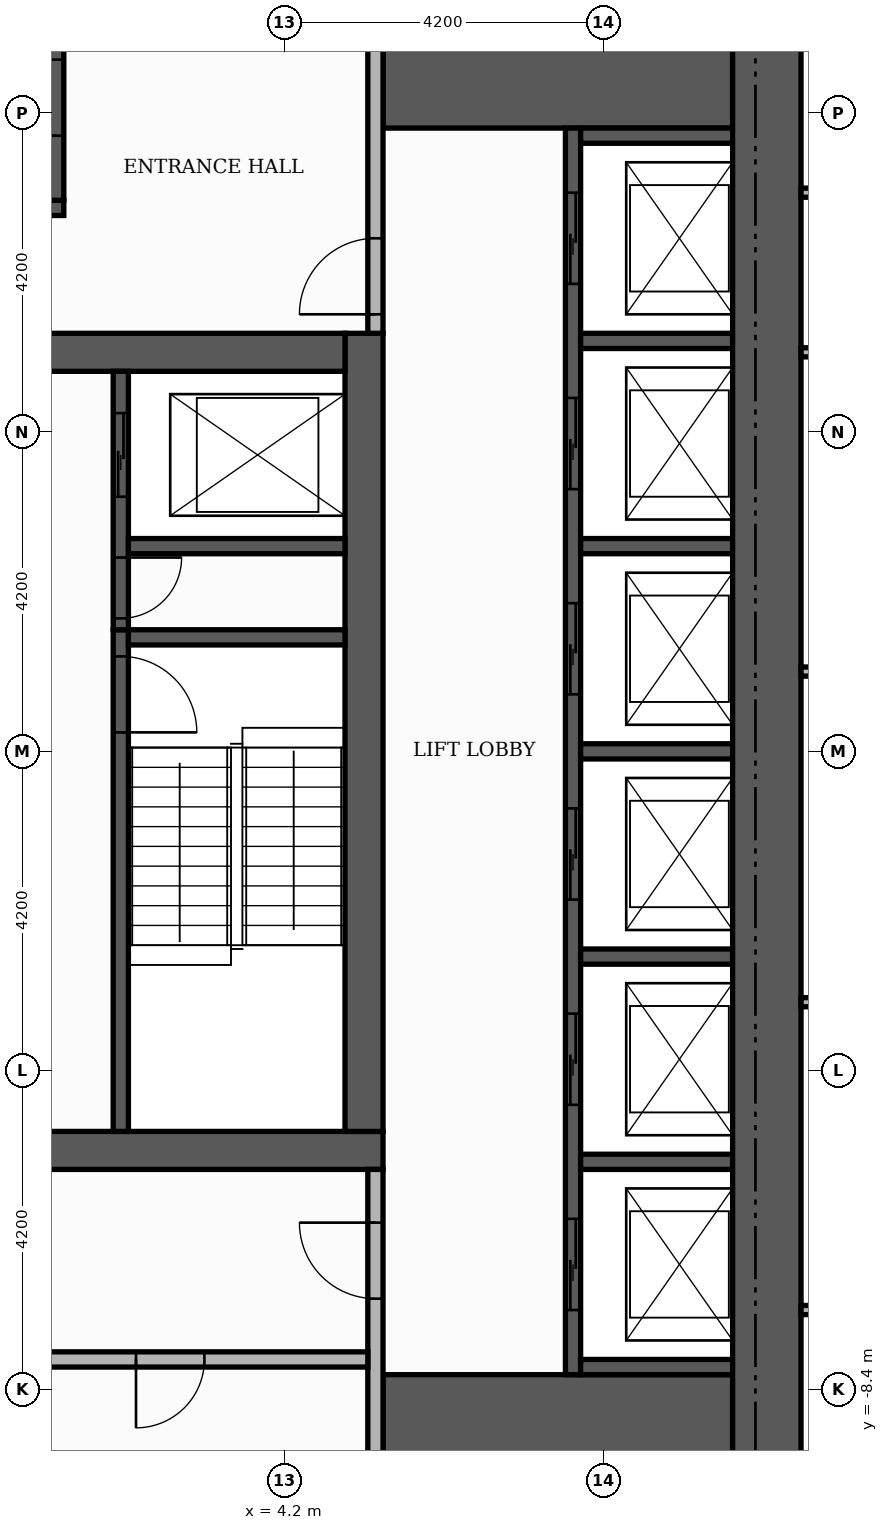
"""IFC4 building model, lengths in metres.
Left out: names, types, materials, properties, quantities, classifications, styles, units other than length and angle.
Written with IfcOpenShell. Run it as: python <this file> out.ifc"""

import sys

from ifc_helpers import new_model, si_unit, direction, frame, frame_2d, origin, place, context, subcontext, project, spatial, rectangle, extrude, element, fill, save


model = new_model("IFC4")
c1 = context("Model", 3, precision=1e-05, world=origin(), true_north=direction((0.0, 1.0)))
c2 = subcontext(c1, "Body", "Model", "MODEL_VIEW")
j1 = project(units=[si_unit("LENGTHUNIT", "METRE"), si_unit("PLANEANGLEUNIT", "RADIAN")], contexts=[c1])
p1 = place(None, origin())
s1 = spatial("IfcSite", under=j1, at=p1, CompositionType="ELEMENT")
p2 = place(p1, origin())
s2 = spatial("IfcBuilding", under=s1, at=p2, CompositionType="ELEMENT")
p3 = place(p2, frame((0.0, 0.0, 137.7)))
s3 = spatial("IfcBuildingStorey", under=s2, at=p3, CompositionType="ELEMENT", Elevation=137.7)
p4 = place(p3, frame((-5.5, -5.25, 0.0), z_axis=(0.0, 0.0, 1.0), x_axis=(1.0, 0.0, 0.0)))
e1 = element("IfcWall", 1, at=p4, inside=s3, PredefinedType="SHEAR", context=c2, shape_type="SweptSolid", body=[
    extrude(rectangle(XDim=11.0, YDim=0.5, at=frame_2d((5.5, 0.0))), origin(), (0.0, 0.0, 1.0), 3.48),
])
p5 = place(p4, frame((4.9, 0.0, 0.0)))
e2 = element("IfcOpeningElement", 2, at=p5, cuts=e1, PredefinedType="OPENING", context=c2, shape_type="SweptSolid", body=[
    extrude(rectangle(XDim=1.2, YDim=2.1, at=frame_2d((0.6, 1.05))), frame((0.0, 0.26, 0.0), z_axis=(0.0, -1.0, 0.0), x_axis=(1.0, 0.0, 0.0)), (0.0, 0.0, 1.0), 0.52),
])
p6 = place(p3, frame((5.25, -5.0, 0.0), z_axis=(0.0, 0.0, 1.0), x_axis=(0.0, 1.0, 0.0)))
e3 = element("IfcWall", 3, at=p6, inside=s3, PredefinedType="SHEAR", context=c2, shape_type="SweptSolid", body=[
    extrude(rectangle(XDim=10.5, YDim=0.5, at=frame_2d((5.25, 0.0))), origin(), (0.0, 0.0, 1.0), 3.48),
])
p7 = place(p3, frame((-5.0, 5.25, 0.0), z_axis=(0.0, 0.0, 1.0), x_axis=(1.0, 0.0, 0.0)))
e4 = element("IfcWall", 4, at=p7, inside=s3, PredefinedType="SHEAR", context=c2, shape_type="SweptSolid", body=[
    extrude(rectangle(XDim=10.0, YDim=0.5, at=frame_2d((5.0, 0.0))), origin(), (0.0, 0.0, 1.0), 3.48),
])
p8 = place(p7, frame((4.4, 0.0, 0.0)))
e5 = element("IfcOpeningElement", 5, at=p8, cuts=e4, PredefinedType="OPENING", context=c2, shape_type="SweptSolid", body=[
    extrude(rectangle(XDim=1.2, YDim=2.1, at=frame_2d((0.6, 1.05))), frame((0.0, 0.26, 0.0), z_axis=(0.0, -1.0, 0.0), x_axis=(1.0, 0.0, 0.0)), (0.0, 0.0, 1.0), 0.52),
])
for number, where, z_axis, x_axis in (
    (6, (5.5, -9.15, 0.0), (0.0, 0.0, 1.0), (1.0, 0.0, 0.0)),
    (7, (5.5, 9.15, 0.0), (0.0, 0.0, 1.0), (1.0, 0.0, 0.0)),
):
    element("IfcWall", number, at=place(p3, frame(where, z_axis=z_axis, x_axis=x_axis)), inside=s3, PredefinedType="SHEAR", context=c2, shape_type="SweptSolid", body=[
        extrude(rectangle(XDim=4.6, YDim=1.9, at=frame_2d((2.3, 0.0))), origin(), (0.0, 0.0, 1.0), 3.48),
    ])
p9 = place(p3, frame((2.05, -5.0, 0.0), z_axis=(0.0, 0.0, 1.0), x_axis=(0.0, 1.0, 0.0)))
e8 = element("IfcWall", 8, at=p9, inside=s3, PredefinedType="SHEAR", context=c2, shape_type="SweptSolid", body=[
    extrude(rectangle(XDim=6.6, YDim=0.2, at=frame_2d((3.3, 0.0))), origin(), (0.0, 0.0, 1.0), 3.48),
])
p10 = place(p9, frame((5.25, 0.0, 0.0)))
e9 = element("IfcOpeningElement", 9, at=p10, cuts=e8, PredefinedType="OPENING", context=c2, shape_type="SweptSolid", body=[
    extrude(rectangle(XDim=1.0, YDim=2.1, at=frame_2d((0.5, 1.05))), frame((0.0, 0.11, 0.0), z_axis=(0.0, -1.0, 0.0), x_axis=(1.0, 0.0, 0.0)), (0.0, 0.0, 1.0), 0.22),
])
p11 = place(p3, frame((2.15, 1.5, 0.0), z_axis=(0.0, 0.0, 1.0), x_axis=(1.0, 0.0, 0.0)))
e10 = element("IfcWall", 10, at=p11, inside=s3, PredefinedType="SHEAR", context=c2, shape_type="SweptSolid", body=[
    extrude(rectangle(XDim=2.85, YDim=0.2, at=frame_2d((1.425, 0.0))), origin(), (0.0, 0.0, 1.0), 3.48),
])
p12 = place(p3, frame((-5.5, 7.15, 0.0), z_axis=(0.0, 0.0, 1.0), x_axis=(1.0, 0.0, 0.0)))
e11 = element("IfcWall", 11, at=p12, inside=s3, PredefinedType="SHEAR", context=c2, shape_type="SweptSolid", body=[
    extrude(rectangle(XDim=6.8, YDim=0.2, at=frame_2d((3.4, 0.0))), origin(), (0.0, 0.0, 1.0), 3.48),
])
p13 = place(p3, frame((1.2, 7.25, 0.0), z_axis=(0.0, 0.0, 1.0), x_axis=(0.0, 1.0, 0.0)))
e12 = element("IfcWall", 12, at=p13, inside=s3, PredefinedType="SHEAR", context=c2, shape_type="SweptSolid", body=[
    extrude(rectangle(XDim=2.85, YDim=0.2, at=frame_2d((1.425, 0.0))), origin(), (0.0, 0.0, 1.0), 3.48),
])
p14 = place(p13, frame((0.85, 0.0, 0.0)))
e13 = element("IfcOpeningElement", 13, at=p14, cuts=e12, PredefinedType="OPENING", context=c2, shape_type="SweptSolid", body=[
    extrude(rectangle(XDim=1.0, YDim=2.1, at=frame_2d((0.5, 1.05))), frame((0.0, 0.11, 0.0), z_axis=(0.0, -1.0, 0.0), x_axis=(1.0, 0.0, 0.0)), (0.0, 0.0, 1.0), 0.22),
])
p15 = place(p3, frame((8.0, -8.2, 0.0), z_axis=(0.0, 0.0, 1.0), x_axis=(0.0, 1.0, 0.0)))
e14 = element("IfcWall", 14, at=p15, inside=s3, PredefinedType="SHEAR", context=c2, shape_type="SweptSolid", body=[
    extrude(rectangle(XDim=16.4, YDim=0.2, at=frame_2d((8.2, 0.0))), origin(), (0.0, 0.0, 1.0), 3.48),
])
p16 = place(p15, frame((0.85, 0.0, 0.0)))
e15 = element("IfcOpeningElement", 15, at=p16, cuts=e14, PredefinedType="OPENING", context=c2, shape_type="SweptSolid", body=[
    extrude(rectangle(XDim=1.2, YDim=2.1, at=frame_2d((0.6, 1.05))), frame((0.0, 0.11, 0.0), z_axis=(0.0, -1.0, 0.0), x_axis=(1.0, 0.0, 0.0)), (0.0, 0.0, 1.0), 0.22),
])
p17 = place(p15, frame((3.55, 0.0, 0.0)))
e16 = element("IfcOpeningElement", 16, at=p17, cuts=e14, PredefinedType="OPENING", context=c2, shape_type="SweptSolid", body=[
    extrude(rectangle(XDim=1.2, YDim=2.1, at=frame_2d((0.6, 1.05))), frame((0.0, 0.11, 0.0), z_axis=(0.0, -1.0, 0.0), x_axis=(1.0, 0.0, 0.0)), (0.0, 0.0, 1.0), 0.22),
])
p18 = place(p15, frame((6.25, 0.0, 0.0)))
e17 = element("IfcOpeningElement", 17, at=p18, cuts=e14, PredefinedType="OPENING", context=c2, shape_type="SweptSolid", body=[
    extrude(rectangle(XDim=1.2, YDim=2.1, at=frame_2d((0.6, 1.05))), frame((0.0, 0.11, 0.0), z_axis=(0.0, -1.0, 0.0), x_axis=(1.0, 0.0, 0.0)), (0.0, 0.0, 1.0), 0.22),
])
p19 = place(p15, frame((8.95, 0.0, 0.0)))
e18 = element("IfcOpeningElement", 18, at=p19, cuts=e14, PredefinedType="OPENING", context=c2, shape_type="SweptSolid", body=[
    extrude(rectangle(XDim=1.2, YDim=2.1, at=frame_2d((0.6, 1.05))), frame((0.0, 0.11, 0.0), z_axis=(0.0, -1.0, 0.0), x_axis=(1.0, 0.0, 0.0)), (0.0, 0.0, 1.0), 0.22),
])
p20 = place(p15, frame((11.65, 0.0, 0.0)))
e19 = element("IfcOpeningElement", 19, at=p20, cuts=e14, PredefinedType="OPENING", context=c2, shape_type="SweptSolid", body=[
    extrude(rectangle(XDim=1.2, YDim=2.1, at=frame_2d((0.6, 1.05))), frame((0.0, 0.11, 0.0), z_axis=(0.0, -1.0, 0.0), x_axis=(1.0, 0.0, 0.0)), (0.0, 0.0, 1.0), 0.22),
])
p21 = place(p15, frame((14.35, 0.0, 0.0)))
e20 = element("IfcOpeningElement", 20, at=p21, cuts=e14, PredefinedType="OPENING", context=c2, shape_type="SweptSolid", body=[
    extrude(rectangle(XDim=1.2, YDim=2.1, at=frame_2d((0.6, 1.05))), frame((0.0, 0.11, 0.0), z_axis=(0.0, -1.0, 0.0), x_axis=(1.0, 0.0, 0.0)), (0.0, 0.0, 1.0), 0.22),
])
for number, where, z_axis, x_axis in (
    (21, (8.1, -8.1, 0.0), (0.0, 0.0, 1.0), (1.0, 0.0, 0.0)),
    (22, (8.1, -5.4, 0.0), (0.0, 0.0, 1.0), (1.0, 0.0, 0.0)),
    (23, (8.1, -2.7, 0.0), (0.0, 0.0, 1.0), (1.0, 0.0, 0.0)),
    (24, (8.1, 0.0, 0.0), (0.0, 0.0, 1.0), (1.0, 0.0, 0.0)),
):
    element("IfcWall", number, at=place(p3, frame(where, z_axis=z_axis, x_axis=x_axis)), inside=s3, PredefinedType="SHEAR", context=c2, shape_type="SweptSolid", body=[
        extrude(rectangle(XDim=2.0, YDim=0.2, at=frame_2d((1.0, 0.0))), origin(), (0.0, 0.0, 1.0), 3.48),
    ])
p22 = place(p3, frame((2.05, 1.6, 0.0), z_axis=(0.0, 0.0, 1.0), x_axis=(0.0, 1.0, 0.0)))
e25 = element("IfcWall", 25, at=p22, inside=s3, PredefinedType="SHEAR", context=c2, shape_type="SweptSolid", body=[
    extrude(rectangle(XDim=3.4, YDim=0.2, at=frame_2d((1.7, 0.0))), origin(), (0.0, 0.0, 1.0), 3.48),
])
p23 = place(p22, frame((1.75, 0.0, 0.0)))
e26 = element("IfcOpeningElement", 26, at=p23, cuts=e25, PredefinedType="OPENING", context=c2, shape_type="SweptSolid", body=[
    extrude(rectangle(XDim=1.1, YDim=2.1, at=frame_2d((0.55, 1.05))), frame((0.0, 0.11, 0.0), z_axis=(0.0, -1.0, 0.0), x_axis=(1.0, 0.0, 0.0)), (0.0, 0.0, 1.0), 0.22),
])
p24 = place(p22, frame((0.15, 0.0, 0.0)))
e27 = element("IfcOpeningElement", 27, at=p24, cuts=e25, PredefinedType="OPENING", context=c2, shape_type="SweptSolid", body=[
    extrude(rectangle(XDim=0.8, YDim=2.1, at=frame_2d((0.4, 1.05))), frame((0.0, 0.11, 0.0), z_axis=(0.0, -1.0, 0.0), x_axis=(1.0, 0.0, 0.0)), (0.0, 0.0, 1.0), 0.22),
])
p25 = place(p3, frame((2.15, 2.7, 0.0), z_axis=(0.0, 0.0, 1.0), x_axis=(1.0, 0.0, 0.0)))
e28 = element("IfcWall", 28, at=p25, inside=s3, PredefinedType="SHEAR", context=c2, shape_type="SweptSolid", body=[
    extrude(rectangle(XDim=2.85, YDim=0.2, at=frame_2d((1.425, 0.0))), origin(), (0.0, 0.0, 1.0), 3.48),
])
for number, where, z_axis, x_axis in (
    (29, (8.1, 2.7, 0.0), (0.0, 0.0, 1.0), (1.0, 0.0, 0.0)),
    (30, (8.1, 5.4, 0.0), (0.0, 0.0, 1.0), (1.0, 0.0, 0.0)),
    (31, (8.1, 8.1, 0.0), (0.0, 0.0, 1.0), (1.0, 0.0, 0.0)),
):
    element("IfcWall", number, at=place(p3, frame(where, z_axis=z_axis, x_axis=x_axis)), inside=s3, PredefinedType="SHEAR", context=c2, shape_type="SweptSolid", body=[
        extrude(rectangle(XDim=2.0, YDim=0.2, at=frame_2d((1.0, 0.0))), origin(), (0.0, 0.0, 1.0), 3.48),
    ])
p26 = place(p3, frame((10.55, -10.1, 0.0), z_axis=(0.0, 0.0, 1.0), x_axis=(0.0, 1.0, 0.0)))
e32 = element("IfcWall", 32, at=p26, inside=s3, PredefinedType="SHEAR", context=c2, shape_type="SweptSolid", body=[
    extrude(rectangle(XDim=20.2, YDim=0.9, at=frame_2d((10.1, 0.0))), origin(), (0.0, 0.0, 1.0), 3.48),
])
p27 = place(p3, frame((5.4, -10.1, 0.0), z_axis=(0.0, 0.0, 1.0), x_axis=(0.0, 1.0, 0.0)))
e33 = element("IfcWall", 33, at=p27, inside=s3, PredefinedType="PARTITIONING", context=c2, shape_type="SweptSolid", body=[
    extrude(rectangle(XDim=4.6, YDim=0.2, at=frame_2d((2.3, 0.0))), origin(), (0.0, 0.0, 1.0), 3.48),
])
p28 = place(p27, frame((2.9, 0.0, 0.0)))
e34 = element("IfcOpeningElement", 34, at=p28, cuts=e33, PredefinedType="OPENING", context=c2, shape_type="SweptSolid", body=[
    extrude(rectangle(XDim=1.0, YDim=2.1, at=frame_2d((0.5, 1.05))), frame((0.0, 0.11, 0.0), z_axis=(0.0, -1.0, 0.0), x_axis=(1.0, 0.0, 0.0)), (0.0, 0.0, 1.0), 0.22),
])
p29 = place(p3, frame((0.1, -8.0, 0.0), z_axis=(0.0, 0.0, 1.0), x_axis=(1.0, 0.0, 0.0)))
e35 = element("IfcWall", 35, at=p29, inside=s3, PredefinedType="PARTITIONING", context=c2, shape_type="SweptSolid", body=[
    extrude(rectangle(XDim=5.2, YDim=0.2, at=frame_2d((2.6, 0.0))), origin(), (0.0, 0.0, 1.0), 3.48),
])
p30 = place(p29, frame((2.15, 0.0, 0.0)))
e36 = element("IfcOpeningElement", 36, at=p30, cuts=e35, PredefinedType="OPENING", context=c2, shape_type="SweptSolid", body=[
    extrude(rectangle(XDim=0.9, YDim=2.1, at=frame_2d((0.45, 1.05))), frame((0.0, 0.11, 0.0), z_axis=(0.0, -1.0, 0.0), x_axis=(1.0, 0.0, 0.0)), (0.0, 0.0, 1.0), 0.22),
])
p31 = place(p3, frame((5.4, 5.5, 0.0), z_axis=(0.0, 0.0, 1.0), x_axis=(0.0, 1.0, 0.0)))
e37 = element("IfcWall", 37, at=p31, inside=s3, PredefinedType="PARTITIONING", context=c2, shape_type="SweptSolid", body=[
    extrude(rectangle(XDim=4.6, YDim=0.2, at=frame_2d((2.3, 0.0))), origin(), (0.0, 0.0, 1.0), 3.48),
])
p32 = place(p31, frame((0.25, 0.0, 0.0)))
e38 = element("IfcOpeningElement", 38, at=p32, cuts=e37, PredefinedType="OPENING", context=c2, shape_type="SweptSolid", body=[
    extrude(rectangle(XDim=1.0, YDim=2.1, at=frame_2d((0.5, 1.05))), frame((0.0, 0.11, 0.0), z_axis=(0.0, -1.0, 0.0), x_axis=(1.0, 0.0, 0.0)), (0.0, 0.0, 1.0), 0.22),
])
p33 = place(p3, frame((11.0, -7.35, 0.0), z_axis=(0.0, 0.0, 1.0), x_axis=(1.0, 0.0, 0.0)))
e39 = element("IfcWall", 39, at=p33, inside=s3, PredefinedType="PARTITIONING", context=c2, shape_type="SweptSolid", body=[
    extrude(rectangle(XDim=8.22, YDim=0.12, at=frame_2d((4.11, 0.0))), origin(), (0.0, 0.0, 1.0), 3.48),
])
p34 = place(p33, frame((3.66, 0.0, 0.0)))
e40 = element("IfcOpeningElement", 40, at=p34, cuts=e39, PredefinedType="OPENING", context=c2, shape_type="SweptSolid", body=[
    extrude(rectangle(XDim=0.9, YDim=2.1, at=frame_2d((0.45, 1.05))), frame((0.0, 0.07, 0.0), z_axis=(0.0, -1.0, 0.0), x_axis=(1.0, 0.0, 0.0)), (0.0, 0.0, 1.0), 0.14),
])
for number, where, z_axis, x_axis in (
    (41, (11.0, -3.3, 0.0), (0.0, 0.0, 1.0), (1.0, 0.0, 0.0)),
    (42, (11.0, 1.05, 0.0), (0.0, 0.0, 1.0), (1.0, 0.0, 0.0)),
    (43, (11.0, 5.25, 0.0), (0.0, 0.0, 1.0), (1.0, 0.0, 0.0)),
    (44, (11.0, 7.35, 0.0), (0.0, 0.0, 1.0), (1.0, 0.0, 0.0)),
):
    element("IfcWall", number, at=place(p3, frame(where, z_axis=z_axis, x_axis=x_axis)), inside=s3, PredefinedType="PARTITIONING", context=c2, shape_type="SweptSolid", body=[
        extrude(rectangle(XDim=8.22, YDim=0.12, at=frame_2d((4.11, 0.0))), origin(), (0.0, 0.0, 1.0), 3.48),
    ])
p35 = place(p16, origin())
e45 = element("IfcDoor", 45, at=p35, inside=s3, OperationType="SLIDING_TO_LEFT", PredefinedType="DOOR", context=c2, shape_type="SweptSolid", body=[
    extrude(rectangle(XDim=1.2, YDim=2.1, at=frame_2d((0.6, 1.05))), frame((0.0, 0.025, 0.0), z_axis=(0.0, -1.0, 0.0), x_axis=(1.0, 0.0, 0.0)), (0.0, 0.0, 1.0), 0.05),
])
fill(e15, e45)
p36 = place(p17, origin())
e46 = element("IfcDoor", 46, at=p36, inside=s3, OperationType="SLIDING_TO_LEFT", PredefinedType="DOOR", context=c2, shape_type="SweptSolid", body=[
    extrude(rectangle(XDim=1.2, YDim=2.1, at=frame_2d((0.6, 1.05))), frame((0.0, 0.025, 0.0), z_axis=(0.0, -1.0, 0.0), x_axis=(1.0, 0.0, 0.0)), (0.0, 0.0, 1.0), 0.05),
])
fill(e16, e46)
p37 = place(p18, origin())
e47 = element("IfcDoor", 47, at=p37, inside=s3, OperationType="SLIDING_TO_LEFT", PredefinedType="DOOR", context=c2, shape_type="SweptSolid", body=[
    extrude(rectangle(XDim=1.2, YDim=2.1, at=frame_2d((0.6, 1.05))), frame((0.0, 0.025, 0.0), z_axis=(0.0, -1.0, 0.0), x_axis=(1.0, 0.0, 0.0)), (0.0, 0.0, 1.0), 0.05),
])
fill(e17, e47)
p38 = place(p19, origin())
e48 = element("IfcDoor", 48, at=p38, inside=s3, OperationType="SLIDING_TO_LEFT", PredefinedType="DOOR", context=c2, shape_type="SweptSolid", body=[
    extrude(rectangle(XDim=1.2, YDim=2.1, at=frame_2d((0.6, 1.05))), frame((0.0, 0.025, 0.0), z_axis=(0.0, -1.0, 0.0), x_axis=(1.0, 0.0, 0.0)), (0.0, 0.0, 1.0), 0.05),
])
fill(e18, e48)
p39 = place(p20, origin())
e49 = element("IfcDoor", 49, at=p39, inside=s3, OperationType="SLIDING_TO_LEFT", PredefinedType="DOOR", context=c2, shape_type="SweptSolid", body=[
    extrude(rectangle(XDim=1.2, YDim=2.1, at=frame_2d((0.6, 1.05))), frame((0.0, 0.025, 0.0), z_axis=(0.0, -1.0, 0.0), x_axis=(1.0, 0.0, 0.0)), (0.0, 0.0, 1.0), 0.05),
])
fill(e19, e49)
p40 = place(p21, origin())
e50 = element("IfcDoor", 50, at=p40, inside=s3, OperationType="SLIDING_TO_LEFT", PredefinedType="DOOR", context=c2, shape_type="SweptSolid", body=[
    extrude(rectangle(XDim=1.2, YDim=2.1, at=frame_2d((0.6, 1.05))), frame((0.0, 0.025, 0.0), z_axis=(0.0, -1.0, 0.0), x_axis=(1.0, 0.0, 0.0)), (0.0, 0.0, 1.0), 0.05),
])
fill(e20, e50)
p41 = place(p23, origin())
e51 = element("IfcDoor", 51, at=p41, inside=s3, OperationType="SLIDING_TO_LEFT", PredefinedType="DOOR", context=c2, shape_type="SweptSolid", body=[
    extrude(rectangle(XDim=1.1, YDim=2.1, at=frame_2d((0.55, 1.05))), frame((0.0, 0.025, 0.0), z_axis=(0.0, -1.0, 0.0), x_axis=(1.0, 0.0, 0.0)), (0.0, 0.0, 1.0), 0.05),
])
fill(e26, e51)
p42 = place(p10, frame((1.0, 0.0, 0.0), z_axis=(0.0, 0.0, 1.0), x_axis=(-1.0, 0.0, 0.0)))
e52 = element("IfcDoor", 52, at=p42, inside=s3, OperationType="SINGLE_SWING_LEFT", PredefinedType="DOOR", context=c2, shape_type="SweptSolid", body=[
    extrude(rectangle(XDim=1.0, YDim=2.1, at=frame_2d((0.5, 1.05))), frame((0.0, 0.025, 0.0), z_axis=(0.0, -1.0, 0.0), x_axis=(1.0, 0.0, 0.0)), (0.0, 0.0, 1.0), 0.05),
])
fill(e9, e52)
p43 = place(p24, frame((0.8, 0.0, 0.0), z_axis=(0.0, 0.0, 1.0), x_axis=(-1.0, 0.0, 0.0)))
e53 = element("IfcDoor", 53, at=p43, inside=s3, OperationType="SINGLE_SWING_RIGHT", PredefinedType="DOOR", context=c2, shape_type="SweptSolid", body=[
    extrude(rectangle(XDim=0.8, YDim=2.1, at=frame_2d((0.4, 1.05))), frame((0.0, 0.025, 0.0), z_axis=(0.0, -1.0, 0.0), x_axis=(1.0, 0.0, 0.0)), (0.0, 0.0, 1.0), 0.05),
])
fill(e27, e53)
p44 = place(p14, origin())
e54 = element("IfcDoor", 54, at=p44, inside=s3, OperationType="SINGLE_SWING_LEFT", PredefinedType="DOOR", context=c2, shape_type="SweptSolid", body=[
    extrude(rectangle(XDim=1.0, YDim=2.1, at=frame_2d((0.5, 1.05))), frame((0.0, 0.025, 0.0), z_axis=(0.0, -1.0, 0.0), x_axis=(1.0, 0.0, 0.0)), (0.0, 0.0, 1.0), 0.05),
])
fill(e13, e54)
p45 = place(p32, origin())
e55 = element("IfcDoor", 55, at=p45, inside=s3, OperationType="SINGLE_SWING_LEFT", PredefinedType="DOOR", context=c2, shape_type="SweptSolid", body=[
    extrude(rectangle(XDim=1.0, YDim=2.1, at=frame_2d((0.5, 1.05))), frame((0.0, 0.025, 0.0), z_axis=(0.0, -1.0, 0.0), x_axis=(1.0, 0.0, 0.0)), (0.0, 0.0, 1.0), 0.05),
])
fill(e38, e55)
p46 = place(p28, origin())
e56 = element("IfcDoor", 56, at=p46, inside=s3, OperationType="SINGLE_SWING_RIGHT", PredefinedType="DOOR", context=c2, shape_type="SweptSolid", body=[
    extrude(rectangle(XDim=1.0, YDim=2.1, at=frame_2d((0.5, 1.05))), frame((0.0, 0.025, 0.0), z_axis=(0.0, -1.0, 0.0), x_axis=(1.0, 0.0, 0.0)), (0.0, 0.0, 1.0), 0.05),
])
fill(e34, e56)
p47 = place(p30, frame((0.9, 0.0, 0.0), z_axis=(0.0, 0.0, 1.0), x_axis=(-1.0, 0.0, 0.0)))
e57 = element("IfcDoor", 57, at=p47, inside=s3, OperationType="SINGLE_SWING_LEFT", PredefinedType="DOOR", context=c2, shape_type="SweptSolid", body=[
    extrude(rectangle(XDim=0.9, YDim=2.1, at=frame_2d((0.45, 1.05))), frame((0.0, 0.025, 0.0), z_axis=(0.0, -1.0, 0.0), x_axis=(1.0, 0.0, 0.0)), (0.0, 0.0, 1.0), 0.05),
])
fill(e36, e57)
save(model, sys.argv[1])
